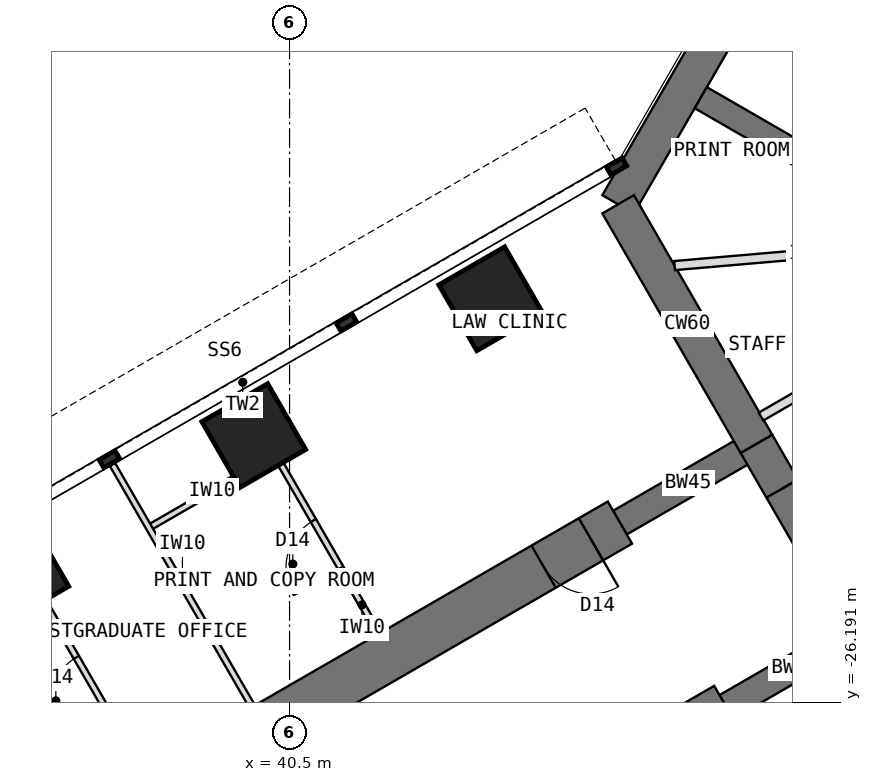
"""IFC4 building model, lengths in metres.
Left out: names, types, materials, properties, quantities, classifications, styles, units other than length and angle.
Written with IfcOpenShell. Run it as: python <this file> out.ifc"""

import sys

from ifc_helpers import new_model, si_unit, direction, frame, frame_2d, origin, origin_2d, place, context, subcontext, project, spatial, rectangle, extrude, element, fill, save


model = new_model("IFC4")
c1 = context("Model", 3, precision=1e-05, world=origin(), true_north=direction((0.0, 1.0)))
c2 = subcontext(c1, "Body", "Model", "MODEL_VIEW")
j1 = project(units=[si_unit("LENGTHUNIT", "METRE"), si_unit("PLANEANGLEUNIT", "RADIAN")], contexts=[c1])
p1 = place(None, origin())
s1 = spatial("IfcSite", under=j1, at=p1, CompositionType="ELEMENT")
p2 = place(p1, origin())
s2 = spatial("IfcBuilding", under=s1, at=p2, CompositionType="ELEMENT")
p3 = place(p2, frame((0.0, 0.0, 157.5)))
s3 = spatial("IfcBuildingStorey", under=s2, at=p3, CompositionType="ELEMENT", Elevation=157.5)
p4 = place(p3, frame((52.202, -7.092, 0.0), z_axis=(0.0, 0.0, 1.0), x_axis=(-0.500005998175, -0.866021940709, 0.0)))
e1 = element("IfcWall", 1, at=p4, inside=s3, PredefinedType="SHEAR", context=c2, shape_type="SweptSolid", body=[
    extrude(rectangle(XDim=12.596, YDim=0.6, at=frame_2d((6.298, 0.0))), origin(), (0.0, 0.0, 1.0), 4.0),
])
p5 = place(p3, frame((45.904, -18.0, 0.0), z_axis=(0.0, 0.0, 1.0), x_axis=(0.500024481964, -0.866011268655, 0.0)))
e2 = element("IfcWall", 2, at=p5, inside=s3, PredefinedType="SHEAR", context=c2, shape_type="SweptSolid", body=[
    extrude(rectangle(XDim=4.548, YDim=0.6, at=frame_2d((2.274, 0.0))), origin(), (0.0, 0.0, 1.0), 4.0),
])
p6 = place(p3, frame((48.178, -21.939, 0.0), z_axis=(0.0, 0.0, 1.0), x_axis=(0.500010275428, -0.866019471182, 0.0)))
e3 = element("IfcWall", 3, at=p6, inside=s3, PredefinedType="SHEAR", context=c2, shape_type="SweptSolid", body=[
    extrude(rectangle(XDim=3.5, YDim=0.6, at=frame_2d((1.75, 0.0))), origin(), (0.0, 0.0, 1.0), 4.0),
])
p7 = place(p6, frame((0.85, 0.0, 0.0)))
e4 = element("IfcOpeningElement", 4, at=p7, cuts=e3, PredefinedType="OPENING", context=c2, shape_type="SweptSolid", body=[
    extrude(rectangle(XDim=1.8, YDim=2.1, at=frame_2d((0.9, 1.05))), frame((0.0, 0.31, 0.0), z_axis=(0.0, -1.0, 0.0), x_axis=(1.0, 0.0, 0.0)), (0.0, 0.0, 1.0), 0.62),
])
p8 = place(p3, frame((49.928, -24.97, 0.0), z_axis=(0.0, 0.0, 1.0), x_axis=(-0.866031863473, -0.499988811324, 0.0)))
e5 = element("IfcWall", 5, at=p8, inside=s3, PredefinedType="SHEAR", context=c2, shape_type="SweptSolid", body=[
    extrude(rectangle(XDim=2.592, YDim=0.45, at=frame_2d((1.296, 0.0))), origin(), (0.0, 0.0, 1.0), 4.0),
])
p9 = place(p3, frame((47.684, -26.266, 0.0), z_axis=(0.0, 0.0, 1.0), x_axis=(-0.866027579429, -0.499996231654, 0.0)))
e6 = element("IfcWall", 6, at=p9, inside=s3, PredefinedType="SHEAR", context=c2, shape_type="SweptSolid", body=[
    extrude(rectangle(XDim=13.2, YDim=0.8, at=frame_2d((6.6, 0.0))), origin(), (0.0, 0.0, 1.0), 4.0),
])
p10 = place(p9, frame((0.55, 0.0, 0.0)))
e7 = element("IfcOpeningElement", 7, at=p10, cuts=e6, PredefinedType="OPENING", context=c2, shape_type="SweptSolid", body=[
    extrude(rectangle(XDim=0.9, YDim=2.1, at=frame_2d((0.45, 1.05))), frame((0.0, 0.41, 0.0), z_axis=(0.0, -1.0, 0.0), x_axis=(1.0, 0.0, 0.0)), (0.0, 0.0, 1.0), 0.82),
])
p11 = place(p9, frame((7.3, 0.0, 0.0)))
e8 = element("IfcOpeningElement", 8, at=p11, cuts=e6, PredefinedType="OPENING", context=c2, shape_type="SweptSolid", body=[
    extrude(rectangle(XDim=0.9, YDim=2.1, at=frame_2d((0.45, 1.05))), frame((0.0, 0.41, 0.0), z_axis=(0.0, -1.0, 0.0), x_axis=(1.0, 0.0, 0.0)), (0.0, 0.0, 1.0), 0.82),
])
p12 = place(p3, frame((48.178, -21.939, 0.0), z_axis=(0.0, 0.0, 1.0), x_axis=(-0.866072649678, -0.499918158782, 0.0)))
e9 = element("IfcWall", 9, at=p12, inside=s3, PredefinedType="SHEAR", context=c2, shape_type="SweptSolid", body=[
    extrude(rectangle(XDim=2.592, YDim=0.45, at=frame_2d((1.296, 0.0))), origin(), (0.0, 0.0, 1.0), 4.0),
])
p13 = place(p3, frame((45.934, -23.234, 0.0), z_axis=(0.0, 0.0, 1.0), x_axis=(-0.866019570528, -0.500010103361, 0.0)))
e10 = element("IfcWall", 10, at=p13, inside=s3, PredefinedType="SHEAR", context=c2, shape_type="SweptSolid", body=[
    extrude(rectangle(XDim=13.2, YDim=0.8, at=frame_2d((6.6, 0.0))), origin(), (0.0, 0.0, 1.0), 4.0),
])
p14 = place(p13, frame((0.55, 0.0, 0.0)))
e11 = element("IfcOpeningElement", 11, at=p14, cuts=e10, PredefinedType="OPENING", context=c2, shape_type="SweptSolid", body=[
    extrude(rectangle(XDim=0.9, YDim=2.1, at=frame_2d((0.45, 1.05))), frame((0.0, 0.41, 0.0), z_axis=(0.0, -1.0, 0.0), x_axis=(1.0, 0.0, 0.0)), (0.0, 0.0, 1.0), 0.82),
])
p15 = place(p13, frame((7.3, 0.0, 0.0)))
e12 = element("IfcOpeningElement", 12, at=p15, cuts=e10, PredefinedType="OPENING", context=c2, shape_type="SweptSolid", body=[
    extrude(rectangle(XDim=0.9, YDim=2.1, at=frame_2d((0.45, 1.05))), frame((0.0, 0.41, 0.0), z_axis=(0.0, -1.0, 0.0), x_axis=(1.0, 0.0, 0.0)), (0.0, 0.0, 1.0), 0.82),
])
for number, where, z_axis, x_axis in (
    (13, (43.809, -19.554, 0.0), (0.0, 0.0, 1.0), (0.866, 0.5, 0.0)),
    (14, (39.912, -21.804, 0.0), (0.0, 0.0, 1.0), (0.866, 0.5, 0.0)),
    (15, (36.014, -24.054, 0.0), (0.0, 0.0, 1.0), (0.866, 0.5, 0.0)),
):
    element("IfcColumn", number, at=place(p3, frame(where, z_axis=z_axis, x_axis=x_axis)), inside=s3, PredefinedType="COLUMN", context=c2, shape_type="SweptSolid", body=[
        extrude(rectangle(XDim=1.25, YDim=1.25, at=origin_2d()), origin(), (0.0, 0.0, 1.0), 4.0),
    ])
p16 = place(p3, frame((52.38, -19.201, 0.0), z_axis=(0.0, 0.0, 1.0), x_axis=(-0.866027317282, 0.49999668571, 0.0)))
e16 = element("IfcWall", 16, at=p16, inside=s3, PredefinedType="SHEAR", context=c2, shape_type="SweptSolid", body=[
    extrude(rectangle(XDim=5.908, YDim=0.4, at=frame_2d((2.954, 0.0))), origin(), (0.0, 0.0, 1.0), 4.0),
])
p17 = place(p3, frame((39.888, -26.263, 0.0), z_axis=(0.0, 0.0, 1.0), x_axis=(-0.500014953309, 0.866016770315, 0.0)))
e17 = element("IfcWall", 17, at=p17, inside=s3, PredefinedType="PARTITIONING", context=c2, shape_type="SweptSolid", body=[
    extrude(rectangle(XDim=4.6, YDim=0.1, at=frame_2d((2.3, 0.0))), origin(), (0.0, 0.0, 1.0), 3.8),
])
p18 = place(p3, frame((40.266, -22.119, 0.0), z_axis=(0.0, 0.0, 1.0), x_axis=(-0.866024647952, -0.500001309137, 0.0)))
e18 = element("IfcWall", 18, at=p18, inside=s3, PredefinedType="PARTITIONING", context=c2, shape_type="SweptSolid", body=[
    extrude(rectangle(XDim=2.4, YDim=0.1, at=frame_2d((1.2, 0.0))), origin(), (0.0, 0.0, 1.0), 3.8),
])
p19 = place(p3, frame((41.967, -25.063, 0.0), z_axis=(0.0, 0.0, 1.0), x_axis=(-0.500062241894, 0.865989465428, 0.0)))
e19 = element("IfcWall", 19, at=p19, inside=s3, PredefinedType="PARTITIONING", context=c2, shape_type="SweptSolid", body=[
    extrude(rectangle(XDim=3.4, YDim=0.1, at=frame_2d((1.7, 0.0))), origin(), (0.0, 0.0, 1.0), 3.8),
])
p20 = place(p19, frame((1.25, 0.0, 0.0)))
e20 = element("IfcOpeningElement", 20, at=p20, cuts=e19, PredefinedType="OPENING", context=c2, shape_type="SweptSolid", body=[
    extrude(rectangle(XDim=0.9, YDim=2.1, at=frame_2d((0.45, 1.05))), frame((0.0, 0.06, 0.0), z_axis=(0.0, -1.0, 0.0), x_axis=(1.0, 0.0, 0.0)), (0.0, 0.0, 1.0), 0.12),
])
p21 = place(p3, frame((38.069, -27.313, 0.0), z_axis=(0.0, 0.0, 1.0), x_axis=(-0.500008388397, 0.866020560687, 0.0)))
e21 = element("IfcWall", 21, at=p21, inside=s3, PredefinedType="PARTITIONING", context=c2, shape_type="SweptSolid", body=[
    extrude(rectangle(XDim=3.4, YDim=0.1, at=frame_2d((1.7, 0.0))), origin(), (0.0, 0.0, 1.0), 3.8),
])
p22 = place(p21, frame((1.25, 0.0, 0.0)))
e22 = element("IfcOpeningElement", 22, at=p22, cuts=e21, PredefinedType="OPENING", context=c2, shape_type="SweptSolid", body=[
    extrude(rectangle(XDim=0.9, YDim=2.1, at=frame_2d((0.45, 1.05))), frame((0.0, 0.06, 0.0), z_axis=(0.0, -1.0, 0.0), x_axis=(1.0, 0.0, 0.0)), (0.0, 0.0, 1.0), 0.12),
])
p23 = place(p3, frame((48.254, -21.49, 0.0), z_axis=(0.0, 0.0, 1.0), x_axis=(0.866025707867, 0.499999473313, 0.0)))
e23 = element("IfcWall", 23, at=p23, inside=s3, PredefinedType="PARTITIONING", context=c2, shape_type="SweptSolid", body=[
    extrude(rectangle(XDim=4.476, YDim=0.15, at=frame_2d((2.238, 0.0))), origin(), (0.0, 0.0, 1.0), 3.8),
])
p24 = place(p23, frame((2.633, 0.0, 0.0)))
e24 = element("IfcOpeningElement", 24, at=p24, cuts=e23, PredefinedType="OPENING", context=c2, shape_type="SweptSolid", body=[
    extrude(rectangle(XDim=1.0, YDim=2.1, at=frame_2d((0.5, 1.05))), frame((0.0, 0.085, 0.0), z_axis=(0.0, -1.0, 0.0), x_axis=(1.0, 0.0, 0.0)), (0.0, 0.0, 1.0), 0.17),
])
p25 = place(p3, frame((51.367, -18.616, 0.0), z_axis=(0.0, 0.0, 1.0), x_axis=(-0.996291540593, -0.086041653535, 0.0)))
e25 = element("IfcWall", 25, at=p25, inside=s3, PredefinedType="PARTITIONING", context=c2, shape_type="SweptSolid", body=[
    extrude(rectangle(XDim=4.551, YDim=0.15, at=frame_2d((2.276, 0.0))), origin(), (0.0, 0.0, 1.0), 3.8),
])
p26 = place(p25, frame((0.865, 0.0, 0.0)))
e26 = element("IfcOpeningElement", 26, at=p26, cuts=e25, PredefinedType="OPENING", context=c2, shape_type="SweptSolid", body=[
    extrude(rectangle(XDim=1.0, YDim=2.1, at=frame_2d((0.5, 1.05))), frame((0.0, 0.085, 0.0), z_axis=(0.0, -1.0, 0.0), x_axis=(1.0, 0.0, 0.0)), (0.0, 0.0, 1.0), 0.17),
])
p27 = place(p7, origin())
e27 = element("IfcDoor", 27, at=p27, inside=s3, OperationType="DOUBLE_DOOR_DOUBLE_SWING", PredefinedType="DOOR", context=c2, shape_type="SweptSolid", body=[
    extrude(rectangle(XDim=1.72, YDim=2.06, at=frame_2d((0.9, 1.03))), frame((0.0, 0.025, 0.0), z_axis=(0.0, -1.0, 0.0), x_axis=(1.0, 0.0, 0.0)), (0.0, 0.0, 1.0), 0.05),
    extrude(rectangle(XDim=0.04, YDim=2.1, at=frame_2d((0.02, 1.05))), frame((0.0, 0.3, 0.0), z_axis=(0.0, -1.0, 0.0), x_axis=(1.0, 0.0, 0.0)), (0.0, 0.0, 1.0), 0.6),
    extrude(rectangle(XDim=0.04, YDim=2.1, at=frame_2d((1.78, 1.05))), frame((0.0, 0.3, 0.0), z_axis=(0.0, -1.0, 0.0), x_axis=(1.0, 0.0, 0.0)), (0.0, 0.0, 1.0), 0.6),
    extrude(rectangle(XDim=1.72, YDim=0.04, at=frame_2d((0.9, 2.08))), frame((0.0, 0.3, 0.0), z_axis=(0.0, -1.0, 0.0), x_axis=(1.0, 0.0, 0.0)), (0.0, 0.0, 1.0), 0.6),
])
fill(e4, e27)
p28 = place(p20, origin())
e28 = element("IfcDoor", 28, at=p28, inside=s3, OperationType="SINGLE_SWING_LEFT", PredefinedType="DOOR", context=c2, shape_type="SweptSolid", body=[
    extrude(rectangle(XDim=0.9, YDim=2.1, at=frame_2d((0.45, 1.05))), frame((0.0, 0.025, 0.0), z_axis=(0.0, -1.0, 0.0), x_axis=(1.0, 0.0, 0.0)), (0.0, 0.0, 1.0), 0.05),
])
fill(e20, e28)
p29 = place(p22, origin())
e29 = element("IfcDoor", 29, at=p29, inside=s3, OperationType="SINGLE_SWING_LEFT", PredefinedType="DOOR", context=c2, shape_type="SweptSolid", body=[
    extrude(rectangle(XDim=0.9, YDim=2.1, at=frame_2d((0.45, 1.05))), frame((0.0, 0.025, 0.0), z_axis=(0.0, -1.0, 0.0), x_axis=(1.0, 0.0, 0.0)), (0.0, 0.0, 1.0), 0.05),
])
fill(e22, e29)
p30 = place(p14, origin())
e30 = element("IfcDoor", 30, at=p30, inside=s3, OperationType="SINGLE_SWING_LEFT", PredefinedType="DOOR", context=c2, shape_type="SweptSolid", body=[
    extrude(rectangle(XDim=0.82, YDim=2.06, at=frame_2d((0.45, 1.03))), frame((0.0, 0.025, 0.0), z_axis=(0.0, -1.0, 0.0), x_axis=(1.0, 0.0, 0.0)), (0.0, 0.0, 1.0), 0.05),
    extrude(rectangle(XDim=0.04, YDim=2.1, at=frame_2d((0.02, 1.05))), frame((0.0, 0.4, 0.0), z_axis=(0.0, -1.0, 0.0), x_axis=(1.0, 0.0, 0.0)), (0.0, 0.0, 1.0), 0.8),
    extrude(rectangle(XDim=0.04, YDim=2.1, at=frame_2d((0.88, 1.05))), frame((0.0, 0.4, 0.0), z_axis=(0.0, -1.0, 0.0), x_axis=(1.0, 0.0, 0.0)), (0.0, 0.0, 1.0), 0.8),
    extrude(rectangle(XDim=0.82, YDim=0.04, at=frame_2d((0.45, 2.08))), frame((0.0, 0.4, 0.0), z_axis=(0.0, -1.0, 0.0), x_axis=(1.0, 0.0, 0.0)), (0.0, 0.0, 1.0), 0.8),
])
fill(e11, e30)
save(model, sys.argv[1])
